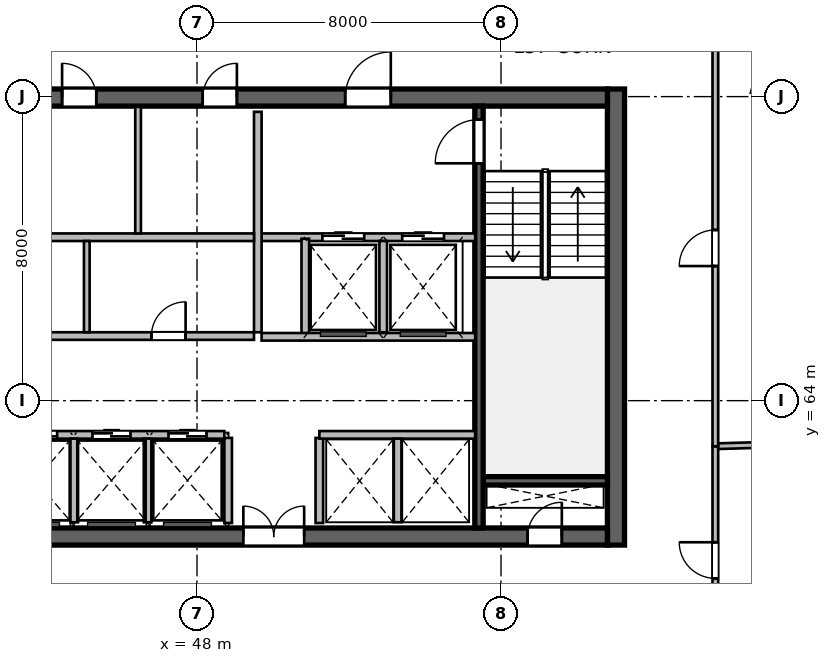
"""IFC4 building model, lengths in metres.
Left out: names, types, materials, properties, quantities, classifications, styles, units other than length and angle.
Written with IfcOpenShell. Run it as: python <this file> out.ifc"""

import sys

from ifc_helpers import new_model, si_unit, direction, frame, frame_2d, origin, place, context, subcontext, project, spatial, rectangle, extrude, source, transform, mapped, element, fill, save


model = new_model("IFC4")
c1 = context("Model", 3, precision=1e-05, world=origin(), true_north=direction((0.0, 1.0)))
c2 = subcontext(c1, "Body", "Model", "MODEL_VIEW")
j1 = project(units=[si_unit("LENGTHUNIT", "METRE"), si_unit("PLANEANGLEUNIT", "RADIAN")], contexts=[c1])
p1 = place(None, origin())
s1 = spatial("IfcSite", under=j1, at=p1, CompositionType="ELEMENT")
p2 = place(p1, origin())
s2 = spatial("IfcBuilding", under=s1, at=p2, CompositionType="ELEMENT")
p3 = place(p2, frame((0.0, 0.0, 235.2)))
s3 = spatial("IfcBuildingStorey", under=s2, at=p3, CompositionType="ELEMENT", Elevation=235.2)
m1 = source(origin(), c2, "Body", "SweptSolid", [
    extrude(rectangle(XDim=12.0, YDim=0.45, at=frame_2d((6.0, 0.0))), origin(), (0.0, 0.0, 1.0), 3.9),
])
p4 = place(p3, frame((59.025, 60.2, 0.0), z_axis=(0.0, 0.0, 1.0), x_axis=(0.0, 1.0, 0.0)))
e1 = element("IfcWall", 1, at=p4, inside=s3, PredefinedType="SHEAR", context=c2, shape_type="MappedRepresentation", body=[
    mapped(m1, transform((0.0, 0.0, 0.0), scale=1.0)),
])
m2 = source(origin(), c2, "Body", "SweptSolid", [
    extrude(rectangle(XDim=21.6, YDim=0.45, at=frame_2d((10.8, 0.0))), origin(), (0.0, 0.0, 1.0), 3.9),
])
p5 = place(p3, frame((37.2, 60.425, 0.0), z_axis=(0.0, 0.0, 1.0), x_axis=(1.0, 0.0, 0.0)))
e2 = element("IfcWall", 2, at=p5, inside=s3, PredefinedType="SHEAR", context=c2, shape_type="MappedRepresentation", body=[
    mapped(m2, transform((0.0, 0.0, 0.0), scale=1.0)),
])
p6 = place(p5, frame((1.1, 0.0, 0.0)))
e3 = element("IfcOpeningElement", 3, at=p6, cuts=e2, PredefinedType="OPENING", context=c2, shape_type="SweptSolid", body=[
    extrude(rectangle(XDim=1.15, YDim=2.15, at=frame_2d((0.575, 1.075))), frame((0.0, 0.235, 0.0), z_axis=(0.0, -1.0, 0.0), x_axis=(1.0, 0.0, 0.0)), (0.0, 0.0, 1.0), 0.47),
])
p7 = place(p5, frame((19.5, 0.0, 0.0)))
e4 = element("IfcOpeningElement", 4, at=p7, cuts=e2, PredefinedType="OPENING", context=c2, shape_type="SweptSolid", body=[
    extrude(rectangle(XDim=0.9, YDim=2.1, at=frame_2d((0.45, 1.05))), frame((0.0, 0.235, 0.0), z_axis=(0.0, -1.0, 0.0), x_axis=(1.0, 0.0, 0.0)), (0.0, 0.0, 1.0), 0.47),
])
p8 = place(p5, frame((12.02, 0.0, 0.0)))
e5 = element("IfcOpeningElement", 5, at=p8, cuts=e2, PredefinedType="OPENING", context=c2, shape_type="SweptSolid", body=[
    extrude(rectangle(XDim=1.6, YDim=2.15, at=frame_2d((0.8, 1.075))), frame((0.0, 0.235, 0.0), z_axis=(0.0, -1.0, 0.0), x_axis=(1.0, 0.0, 0.0)), (0.0, 0.0, 1.0), 0.47),
])
p9 = place(p3, frame((37.2, 71.975, 0.0), z_axis=(0.0, 0.0, 1.0), x_axis=(1.0, 0.0, 0.0)))
e6 = element("IfcWall", 6, at=p9, inside=s3, PredefinedType="SHEAR", context=c2, shape_type="MappedRepresentation", body=[
    mapped(m2, transform((0.0, 0.0, 0.0), scale=1.0)),
])
p10 = place(p9, frame((1.2, 0.0, 0.0)))
e7 = element("IfcOpeningElement", 7, at=p10, cuts=e6, PredefinedType="OPENING", context=c2, shape_type="SweptSolid", body=[
    extrude(rectangle(XDim=0.9, YDim=2.1, at=frame_2d((0.45, 1.05))), frame((0.0, 0.235, 0.0), z_axis=(0.0, -1.0, 0.0), x_axis=(1.0, 0.0, 0.0)), (0.0, 0.0, 1.0), 0.47),
])
p11 = place(p9, frame((14.7, 0.0, 0.0)))
e8 = element("IfcOpeningElement", 8, at=p11, cuts=e6, PredefinedType="OPENING", context=c2, shape_type="SweptSolid", body=[
    extrude(rectangle(XDim=1.2, YDim=2.15, at=frame_2d((0.6, 1.075))), frame((0.0, 0.235, 0.0), z_axis=(0.0, -1.0, 0.0), x_axis=(1.0, 0.0, 0.0)), (0.0, 0.0, 1.0), 0.47),
])
p12 = place(p9, frame((4.15, 0.0, 0.0)))
e9 = element("IfcOpeningElement", 9, at=p12, cuts=e6, PredefinedType="OPENING", context=c2, shape_type="SweptSolid", body=[
    extrude(rectangle(XDim=1.3, YDim=2.15, at=frame_2d((0.65, 1.075))), frame((0.0, 0.235, 0.0), z_axis=(0.0, -1.0, 0.0), x_axis=(1.0, 0.0, 0.0)), (0.0, 0.0, 1.0), 0.47),
])
p13 = place(p9, frame((7.25, 0.0, 0.0)))
e10 = element("IfcOpeningElement", 10, at=p13, cuts=e6, PredefinedType="OPENING", context=c2, shape_type="SweptSolid", body=[
    extrude(rectangle(XDim=0.9, YDim=2.1, at=frame_2d((0.45, 1.05))), frame((0.0, 0.235, 0.0), z_axis=(0.0, -1.0, 0.0), x_axis=(1.0, 0.0, 0.0)), (0.0, 0.0, 1.0), 0.47),
])
p14 = place(p9, frame((10.95, 0.0, 0.0)))
e11 = element("IfcOpeningElement", 11, at=p14, cuts=e6, PredefinedType="OPENING", context=c2, shape_type="SweptSolid", body=[
    extrude(rectangle(XDim=0.9, YDim=2.1, at=frame_2d((0.45, 1.05))), frame((0.0, 0.235, 0.0), z_axis=(0.0, -1.0, 0.0), x_axis=(1.0, 0.0, 0.0)), (0.0, 0.0, 1.0), 0.47),
])
m3 = source(origin(), c2, "Body", "SweptSolid", [
    extrude(rectangle(XDim=3.27, YDim=0.22, at=frame_2d((1.635, 0.0))), origin(), (0.0, 0.0, 1.0), 3.9),
])
p15 = place(p3, frame((55.53, 61.89, 0.0), z_axis=(0.0, 0.0, 1.0), x_axis=(1.0, 0.0, 0.0)))
e12 = element("IfcWall", 12, at=p15, inside=s3, PredefinedType="SHEAR", context=c2, shape_type="MappedRepresentation", body=[
    mapped(m3, transform((0.0, 0.0, 0.0), scale=1.0)),
])
m4 = source(origin(), c2, "Body", "SweptSolid", [
    extrude(rectangle(XDim=11.1, YDim=0.22, at=frame_2d((5.55, 0.0))), origin(), (0.0, 0.0, 1.0), 3.9),
])
p16 = place(p3, frame((55.42, 60.65, 0.0), z_axis=(0.0, 0.0, 1.0), x_axis=(0.0, 1.0, 0.0)))
e13 = element("IfcWall", 13, at=p16, inside=s3, PredefinedType="SHEAR", context=c2, shape_type="MappedRepresentation", body=[
    mapped(m4, transform((0.0, 0.0, 0.0), scale=1.0)),
])
p17 = place(p16, frame((9.595, 0.0, 0.0)))
e14 = element("IfcOpeningElement", 14, at=p17, cuts=e13, PredefinedType="OPENING", context=c2, shape_type="SweptSolid", body=[
    extrude(rectangle(XDim=1.15, YDim=2.15, at=frame_2d((0.575, 1.075))), frame((0.0, 0.12, 0.0), z_axis=(0.0, -1.0, 0.0), x_axis=(1.0, 0.0, 0.0)), (0.0, 0.0, 1.0), 0.24),
])
m5 = source(origin(), c2, "Body", "SweptSolid", [
    extrude(rectangle(XDim=2.24, YDim=0.2, at=frame_2d((1.12, 0.0))), origin(), (0.0, 0.0, 1.0), 3.65),
])
for number, where, z_axis, x_axis in (
    (15, (48.82, 60.78, 0.0), (0.0, 0.0, 1.0), (0.0, 1.0, 0.0)),
    (16, (51.22, 60.78, 0.0), (0.0, 0.0, 1.0), (0.0, 1.0, 0.0)),
):
    element("IfcWall", number, at=place(p3, frame(where, z_axis=z_axis, x_axis=x_axis)), inside=s3, PredefinedType="SOLIDWALL", context=c2, shape_type="MappedRepresentation", body=[
        mapped(m5, transform((0.0, 0.0, 0.0), scale=1.0)),
    ])
m6 = source(origin(), c2, "Body", "SweptSolid", [
    extrude(rectangle(XDim=5.62, YDim=0.2, at=frame_2d((2.81, 0.0))), origin(), (0.0, 0.0, 1.0), 3.65),
])
p18 = place(p3, frame((49.7, 68.3, 0.0), z_axis=(0.0, 0.0, 1.0), x_axis=(1.0, 0.0, 0.0)))
e17 = element("IfcWall", 17, at=p18, inside=s3, PredefinedType="SOLIDWALL", context=c2, shape_type="MappedRepresentation", body=[
    mapped(m6, transform((0.0, 0.0, 0.0), scale=1.0)),
])
p19 = place(p18, frame((1.6, 0.0, 0.0)))
e18 = element("IfcOpeningElement", 18, at=p19, cuts=e17, PredefinedType="OPENING", context=c2, shape_type="SweptSolid", body=[
    extrude(rectangle(XDim=1.1, YDim=2.15, at=frame_2d((0.55, 1.075))), frame((0.0, 0.11, 0.0), z_axis=(0.0, -1.0, 0.0), x_axis=(1.0, 0.0, 0.0)), (0.0, 0.0, 1.0), 0.22),
])
p20 = place(p18, frame((3.7, 0.0, 0.0)))
e19 = element("IfcOpeningElement", 19, at=p20, cuts=e17, PredefinedType="OPENING", context=c2, shape_type="SweptSolid", body=[
    extrude(rectangle(XDim=1.1, YDim=2.15, at=frame_2d((0.55, 1.075))), frame((0.0, 0.11, 0.0), z_axis=(0.0, -1.0, 0.0), x_axis=(1.0, 0.0, 0.0)), (0.0, 0.0, 1.0), 0.22),
])
m7 = source(origin(), c2, "Body", "SweptSolid", [
    extrude(rectangle(XDim=5.8, YDim=0.2, at=frame_2d((2.9, 0.0))), origin(), (0.0, 0.0, 1.0), 3.65),
])
p21 = place(p3, frame((49.6, 65.8, 0.0), z_axis=(0.0, 0.0, 1.0), x_axis=(0.0, 1.0, 0.0)))
e20 = element("IfcWall", 20, at=p21, inside=s3, PredefinedType="SOLIDWALL", context=c2, shape_type="MappedRepresentation", body=[
    mapped(m7, transform((0.0, 0.0, 0.0), scale=1.0)),
])
m8 = source(origin(), c2, "Body", "SweptSolid", [
    extrude(rectangle(XDim=2.58, YDim=0.2, at=frame_2d((1.29, 0.0))), origin(), (0.0, 0.0, 1.0), 3.65),
])
p22 = place(p3, frame((50.85, 65.68, 0.0), z_axis=(0.0, 0.0, 1.0), x_axis=(0.0, 1.0, 0.0)))
e21 = element("IfcWall", 21, at=p22, inside=s3, PredefinedType="SOLIDWALL", context=c2, shape_type="MappedRepresentation", body=[
    mapped(m8, transform((0.0, 0.0, 0.0), scale=1.0)),
])
m9 = source(origin(), c2, "Body", "SweptSolid", [
    extrude(rectangle(XDim=2.4, YDim=0.2, at=frame_2d((1.2, 0.0))), origin(), (0.0, 0.0, 1.0), 3.65),
])
p23 = place(p3, frame((52.9, 65.8, 0.0), z_axis=(0.0, 0.0, 1.0), x_axis=(0.0, 1.0, 0.0)))
e22 = element("IfcWall", 22, at=p23, inside=s3, PredefinedType="SOLIDWALL", context=c2, shape_type="MappedRepresentation", body=[
    mapped(m9, transform((0.0, 0.0, 0.0), scale=1.0)),
])
p24 = place(p3, frame((49.7, 65.68, 0.0), z_axis=(0.0, 0.0, 1.0), x_axis=(1.0, 0.0, 0.0)))
e23 = element("IfcWall", 23, at=p24, inside=s3, PredefinedType="SOLIDWALL", context=c2, shape_type="MappedRepresentation", body=[
    mapped(m6, transform((0.0, 0.0, 0.0), scale=1.0)),
])
m10 = source(origin(), c2, "Body", "SweptSolid", [
    extrude(rectangle(XDim=8.8, YDim=0.2, at=frame_2d((4.4, 0.0))), origin(), (0.0, 0.0, 1.0), 3.65),
])
p25 = place(p3, frame((40.7, 68.3, 0.0), z_axis=(0.0, 0.0, 1.0), x_axis=(1.0, 0.0, 0.0)))
e24 = element("IfcWall", 24, at=p25, inside=s3, PredefinedType="SOLIDWALL", context=c2, shape_type="MappedRepresentation", body=[
    mapped(m10, transform((0.0, 0.0, 0.0), scale=1.0)),
])
m11 = source(origin(), c2, "Body", "SweptSolid", [
    extrude(rectangle(XDim=3.33, YDim=0.15, at=frame_2d((1.665, 0.0))), origin(), (0.0, 0.0, 1.0), 3.65),
])
p26 = place(p3, frame((46.45, 68.4, 0.0), z_axis=(0.0, 0.0, 1.0), x_axis=(0.0, 1.0, 0.0)))
e25 = element("IfcWall", 25, at=p26, inside=s3, PredefinedType="PARTITIONING", context=c2, shape_type="MappedRepresentation", body=[
    mapped(m11, transform((0.0, 0.0, 0.0), scale=1.0)),
])
m12 = source(origin(), c2, "Body", "SweptSolid", [
    extrude(rectangle(XDim=8.02, YDim=0.2, at=frame_2d((4.01, 0.0))), origin(), (0.0, 0.0, 1.0), 3.65),
])
p27 = place(p3, frame((40.7, 63.1, 0.0), z_axis=(0.0, 0.0, 1.0), x_axis=(1.0, 0.0, 0.0)))
e26 = element("IfcWall", 26, at=p27, inside=s3, PredefinedType="SOLIDWALL", context=c2, shape_type="MappedRepresentation", body=[
    mapped(m12, transform((0.0, 0.0, 0.0), scale=1.0)),
])
p28 = place(p27, frame((0.72, 0.0, 0.0)))
e27 = element("IfcOpeningElement", 27, at=p28, cuts=e26, PredefinedType="OPENING", context=c2, shape_type="SweptSolid", body=[
    extrude(rectangle(XDim=1.0, YDim=2.15, at=frame_2d((0.5, 1.075))), frame((0.0, 0.11, 0.0), z_axis=(0.0, -1.0, 0.0), x_axis=(1.0, 0.0, 0.0)), (0.0, 0.0, 1.0), 0.22),
])
p29 = place(p27, frame((2.62, 0.0, 0.0)))
e28 = element("IfcOpeningElement", 28, at=p29, cuts=e26, PredefinedType="OPENING", context=c2, shape_type="SweptSolid", body=[
    extrude(rectangle(XDim=1.0, YDim=2.15, at=frame_2d((0.5, 1.075))), frame((0.0, 0.11, 0.0), z_axis=(0.0, -1.0, 0.0), x_axis=(1.0, 0.0, 0.0)), (0.0, 0.0, 1.0), 0.22),
])
p30 = place(p27, frame((4.55, 0.0, 0.0)))
e29 = element("IfcOpeningElement", 29, at=p30, cuts=e26, PredefinedType="OPENING", context=c2, shape_type="SweptSolid", body=[
    extrude(rectangle(XDim=1.0, YDim=2.15, at=frame_2d((0.5, 1.075))), frame((0.0, 0.11, 0.0), z_axis=(0.0, -1.0, 0.0), x_axis=(1.0, 0.0, 0.0)), (0.0, 0.0, 1.0), 0.22),
])
p31 = place(p27, frame((6.55, 0.0, 0.0)))
e30 = element("IfcOpeningElement", 30, at=p31, cuts=e26, PredefinedType="OPENING", context=c2, shape_type="SweptSolid", body=[
    extrude(rectangle(XDim=1.0, YDim=2.15, at=frame_2d((0.5, 1.075))), frame((0.0, 0.11, 0.0), z_axis=(0.0, -1.0, 0.0), x_axis=(1.0, 0.0, 0.0)), (0.0, 0.0, 1.0), 0.22),
])
m13 = source(origin(), c2, "Body", "SweptSolid", [
    extrude(rectangle(XDim=4.1, YDim=0.2, at=frame_2d((2.05, 0.0))), origin(), (0.0, 0.0, 1.0), 3.65),
])
p32 = place(p3, frame((51.22, 63.1, 0.0), z_axis=(0.0, 0.0, 1.0), x_axis=(1.0, 0.0, 0.0)))
e31 = element("IfcWall", 31, at=p32, inside=s3, PredefinedType="SOLIDWALL", context=c2, shape_type="MappedRepresentation", body=[
    mapped(m13, transform((0.0, 0.0, 0.0), scale=1.0)),
])
m14 = source(origin(), c2, "Body", "SweptSolid", [
    extrude(rectangle(XDim=2.2, YDim=0.2, at=frame_2d((1.1, 0.0))), origin(), (0.0, 0.0, 1.0), 3.65),
])
for number, where, z_axis, x_axis in (
    (32, (44.77, 60.8, 0.0), (0.0, 0.0, 1.0), (0.0, 1.0, 0.0)),
    (33, (46.7, 60.8, 0.0), (0.0, 0.0, 1.0), (0.0, 1.0, 0.0)),
    (34, (53.28, 60.8, 0.0), (0.0, 0.0, 1.0), (0.0, 1.0, 0.0)),
):
    element("IfcWall", number, at=place(p3, frame(where, z_axis=z_axis, x_axis=x_axis)), inside=s3, PredefinedType="SOLIDWALL", context=c2, shape_type="MappedRepresentation", body=[
        mapped(m14, transform((0.0, 0.0, 0.0), scale=1.0)),
    ])
p33 = place(p3, frame((40.7, 65.7, 0.0), z_axis=(0.0, 0.0, 1.0), x_axis=(1.0, 0.0, 0.0)))
e35 = element("IfcWall", 35, at=p33, inside=s3, PredefinedType="SOLIDWALL", context=c2, shape_type="MappedRepresentation", body=[
    mapped(m10, transform((0.0, 0.0, 0.0), scale=1.0)),
])
p34 = place(p33, frame((1.6, 0.0, 0.0)))
e36 = element("IfcOpeningElement", 36, at=p34, cuts=e35, PredefinedType="OPENING", context=c2, shape_type="SweptSolid", body=[
    extrude(rectangle(XDim=0.9, YDim=2.1, at=frame_2d((0.45, 1.05))), frame((0.0, 0.11, 0.0), z_axis=(0.0, -1.0, 0.0), x_axis=(1.0, 0.0, 0.0)), (0.0, 0.0, 1.0), 0.22),
])
p35 = place(p33, frame((6.1, 0.0, 0.0)))
e37 = element("IfcOpeningElement", 37, at=p35, cuts=e35, PredefinedType="OPENING", context=c2, shape_type="SweptSolid", body=[
    extrude(rectangle(XDim=0.9, YDim=2.1, at=frame_2d((0.45, 1.05))), frame((0.0, 0.11, 0.0), z_axis=(0.0, -1.0, 0.0), x_axis=(1.0, 0.0, 0.0)), (0.0, 0.0, 1.0), 0.22),
])
m15 = source(origin(), c2, "Body", "SweptSolid", [
    extrude(rectangle(XDim=2.4, YDim=0.15, at=frame_2d((1.2, 0.0))), origin(), (0.0, 0.0, 1.0), 3.65),
])
p36 = place(p3, frame((45.1, 65.8, 0.0), z_axis=(0.0, 0.0, 1.0), x_axis=(0.0, 1.0, 0.0)))
e38 = element("IfcWall", 38, at=p36, inside=s3, PredefinedType="PARTITIONING", context=c2, shape_type="MappedRepresentation", body=[
    mapped(m15, transform((0.0, 0.0, 0.0), scale=1.0)),
])
m16 = source(origin(), c2, "Body", "SweptSolid", [
    extrude(rectangle(XDim=13.315, YDim=0.15, at=frame_2d((6.657, 0.0))), origin(), (0.0, 0.0, 1.0), 3.65),
])
p37 = place(p3, frame((61.64, 62.8, 0.0), z_axis=(0.0, 0.0, 1.0), x_axis=(0.999574400598, 0.029172207124, 0.0)))
e39 = element("IfcWall", 39, at=p37, inside=s3, PredefinedType="PARTITIONING", context=c2, shape_type="MappedRepresentation", body=[
    mapped(m16, transform((0.0, 0.0, 0.0), scale=1.0)),
])
m17 = source(origin(), c2, "Body", "SweptSolid", [
    extrude(rectangle(XDim=4.84, YDim=0.15, at=frame_2d((2.42, 0.0))), origin(), (0.0, 0.0, 1.0), 3.65),
])
p38 = place(p3, frame((61.64, 57.96, 0.0), z_axis=(0.0, 0.0, 1.0), x_axis=(0.0, 1.0, 0.0)))
e40 = element("IfcWall", 40, at=p38, inside=s3, PredefinedType="PARTITIONING", context=c2, shape_type="MappedRepresentation", body=[
    mapped(m17, transform((0.0, 0.0, 0.0), scale=1.0)),
])
p39 = place(p38, frame((1.364, 0.0, 0.0)))
e41 = element("IfcOpeningElement", 41, at=p39, cuts=e40, PredefinedType="OPENING", context=c2, shape_type="SweptSolid", body=[
    extrude(rectangle(XDim=0.95, YDim=2.1, at=frame_2d((0.475, 1.05))), frame((0.0, 0.085, 0.0), z_axis=(0.0, -1.0, 0.0), x_axis=(1.0, 0.0, 0.0)), (0.0, 0.0, 1.0), 0.17),
])
m18 = source(origin(), c2, "Body", "SweptSolid", [
    extrude(rectangle(XDim=13.727, YDim=0.15, at=frame_2d((6.864, 0.0))), origin(), (0.0, 0.0, 1.0), 3.65),
])
p40 = place(p3, frame((61.64, 62.8, 0.0), z_axis=(0.0, 0.0, 1.0), x_axis=(0.0, 1.0, 0.0)))
e42 = element("IfcWall", 42, at=p40, inside=s3, PredefinedType="PARTITIONING", context=c2, shape_type="MappedRepresentation", body=[
    mapped(m18, transform((0.0, 0.0, 0.0), scale=1.0)),
])
p41 = place(p40, frame((4.741, 0.0, 0.0)))
e43 = element("IfcOpeningElement", 43, at=p41, cuts=e42, PredefinedType="OPENING", context=c2, shape_type="SweptSolid", body=[
    extrude(rectangle(XDim=0.95, YDim=2.1, at=frame_2d((0.475, 1.05))), frame((0.0, 0.085, 0.0), z_axis=(0.0, -1.0, 0.0), x_axis=(1.0, 0.0, 0.0)), (0.0, 0.0, 1.0), 0.17),
])
m19 = source(origin(), c2, "Body", "SweptSolid", [
    extrude(rectangle(XDim=0.9, YDim=2.1, at=frame_2d((0.45, 1.05))), frame((0.0, 0.025, 0.0), z_axis=(0.0, -1.0, 0.0), x_axis=(1.0, 0.0, 0.0)), (0.0, 0.0, 1.0), 0.05),
])
p42 = place(p7, origin())
e44 = element("IfcDoor", 44, at=p42, inside=s3, OperationType="SINGLE_SWING_RIGHT", PredefinedType="DOOR", context=c2, shape_type="MappedRepresentation", body=[
    mapped(m19, transform((0.0, 0.0, 0.0), scale=1.0)),
])
fill(e4, e44)
m20 = source(origin(), c2, "Body", "SweptSolid", [
    extrude(rectangle(XDim=1.15, YDim=2.15, at=frame_2d((0.575, 1.075))), frame((0.0, 0.025, 0.0), z_axis=(0.0, -1.0, 0.0), x_axis=(1.0, 0.0, 0.0)), (0.0, 0.0, 1.0), 0.05),
])
p43 = place(p17, origin())
e45 = element("IfcDoor", 45, at=p43, inside=s3, OperationType="SINGLE_SWING_LEFT", PredefinedType="DOOR", context=c2, shape_type="MappedRepresentation", body=[
    mapped(m20, transform((0.0, 0.0, 0.0), scale=1.0)),
])
fill(e14, e45)
m21 = source(origin(), c2, "Body", "SweptSolid", [
    extrude(rectangle(XDim=1.6, YDim=2.15, at=frame_2d((0.8, 1.075))), frame((0.0, 0.025, 0.0), z_axis=(0.0, -1.0, 0.0), x_axis=(1.0, 0.0, 0.0)), (0.0, 0.0, 1.0), 0.05),
])
p44 = place(p8, origin())
e46 = element("IfcDoor", 46, at=p44, inside=s3, OperationType="DOUBLE_DOOR_SINGLE_SWING", PredefinedType="DOOR", context=c2, shape_type="MappedRepresentation", body=[
    mapped(m21, transform((0.0, 0.0, 0.0), scale=1.0)),
])
fill(e5, e46)
m22 = source(origin(), c2, "Body", "SweptSolid", [
    extrude(rectangle(XDim=1.2, YDim=2.15, at=frame_2d((0.6, 1.075))), frame((0.0, 0.025, 0.0), z_axis=(0.0, -1.0, 0.0), x_axis=(1.0, 0.0, 0.0)), (0.0, 0.0, 1.0), 0.05),
])
p45 = place(p11, origin())
e47 = element("IfcDoor", 47, at=p45, inside=s3, OperationType="SINGLE_SWING_RIGHT", PredefinedType="DOOR", context=c2, shape_type="MappedRepresentation", body=[
    mapped(m22, transform((0.0, 0.0, 0.0), scale=1.0)),
])
fill(e8, e47)
m23 = source(origin(), c2, "Body", "SweptSolid", [
    extrude(rectangle(XDim=1.1, YDim=2.15, at=frame_2d((0.55, 1.075))), frame((0.0, 0.025, 0.0), z_axis=(0.0, -1.0, 0.0), x_axis=(1.0, 0.0, 0.0)), (0.0, 0.0, 1.0), 0.05),
])
p46 = place(p19, origin())
e48 = element("IfcDoor", 48, at=p46, inside=s3, OperationType="DOUBLE_DOOR_SLIDING", PredefinedType="DOOR", context=c2, shape_type="MappedRepresentation", body=[
    mapped(m23, transform((0.0, 0.0, 0.0), scale=1.0)),
])
fill(e18, e48)
p47 = place(p20, origin())
e49 = element("IfcDoor", 49, at=p47, inside=s3, OperationType="DOUBLE_DOOR_SLIDING", PredefinedType="DOOR", context=c2, shape_type="MappedRepresentation", body=[
    mapped(m23, transform((0.0, 0.0, 0.0), scale=1.0)),
])
fill(e19, e49)
p48 = place(p13, origin())
e50 = element("IfcDoor", 50, at=p48, inside=s3, OperationType="SINGLE_SWING_LEFT", PredefinedType="DOOR", context=c2, shape_type="MappedRepresentation", body=[
    mapped(m19, transform((0.0, 0.0, 0.0), scale=1.0)),
])
fill(e10, e50)
p49 = place(p14, origin())
e51 = element("IfcDoor", 51, at=p49, inside=s3, OperationType="SINGLE_SWING_RIGHT", PredefinedType="DOOR", context=c2, shape_type="MappedRepresentation", body=[
    mapped(m19, transform((0.0, 0.0, 0.0), scale=1.0)),
])
fill(e11, e51)
m24 = source(origin(), c2, "Body", "SweptSolid", [
    extrude(rectangle(XDim=1.0, YDim=2.15, at=frame_2d((0.5, 1.075))), frame((0.0, 0.025, 0.0), z_axis=(0.0, -1.0, 0.0), x_axis=(1.0, 0.0, 0.0)), (0.0, 0.0, 1.0), 0.05),
])
p50 = place(p29, origin())
e52 = element("IfcDoor", 52, at=p50, inside=s3, OperationType="DOUBLE_DOOR_SLIDING", PredefinedType="DOOR", context=c2, shape_type="MappedRepresentation", body=[
    mapped(m24, transform((0.0, 0.0, 0.0), scale=1.0)),
])
fill(e28, e52)
p51 = place(p30, origin())
e53 = element("IfcDoor", 53, at=p51, inside=s3, OperationType="DOUBLE_DOOR_SLIDING", PredefinedType="DOOR", context=c2, shape_type="MappedRepresentation", body=[
    mapped(m24, transform((0.0, 0.0, 0.0), scale=1.0)),
])
fill(e29, e53)
p52 = place(p31, origin())
e54 = element("IfcDoor", 54, at=p52, inside=s3, OperationType="DOUBLE_DOOR_SLIDING", PredefinedType="DOOR", context=c2, shape_type="MappedRepresentation", body=[
    mapped(m24, transform((0.0, 0.0, 0.0), scale=1.0)),
])
fill(e30, e54)
p53 = place(p35, origin())
e55 = element("IfcDoor", 55, at=p53, inside=s3, OperationType="SINGLE_SWING_RIGHT", PredefinedType="DOOR", context=c2, shape_type="MappedRepresentation", body=[
    mapped(m19, transform((0.0, 0.0, 0.0), scale=1.0)),
])
fill(e37, e55)
m25 = source(origin(), c2, "Body", "SweptSolid", [
    extrude(rectangle(XDim=0.95, YDim=2.1, at=frame_2d((0.475, 1.05))), frame((0.0, 0.025, 0.0), z_axis=(0.0, -1.0, 0.0), x_axis=(1.0, 0.0, 0.0)), (0.0, 0.0, 1.0), 0.05),
])
p54 = place(p39, origin())
e56 = element("IfcDoor", 56, at=p54, inside=s3, OperationType="SINGLE_SWING_RIGHT", PredefinedType="DOOR", context=c2, shape_type="MappedRepresentation", body=[
    mapped(m25, transform((0.0, 0.0, 0.0), scale=1.0)),
])
fill(e41, e56)
p55 = place(p41, origin())
e57 = element("IfcDoor", 57, at=p55, inside=s3, OperationType="SINGLE_SWING_LEFT", PredefinedType="DOOR", context=c2, shape_type="MappedRepresentation", body=[
    mapped(m25, transform((0.0, 0.0, 0.0), scale=1.0)),
])
fill(e43, e57)
save(model, sys.argv[1])
